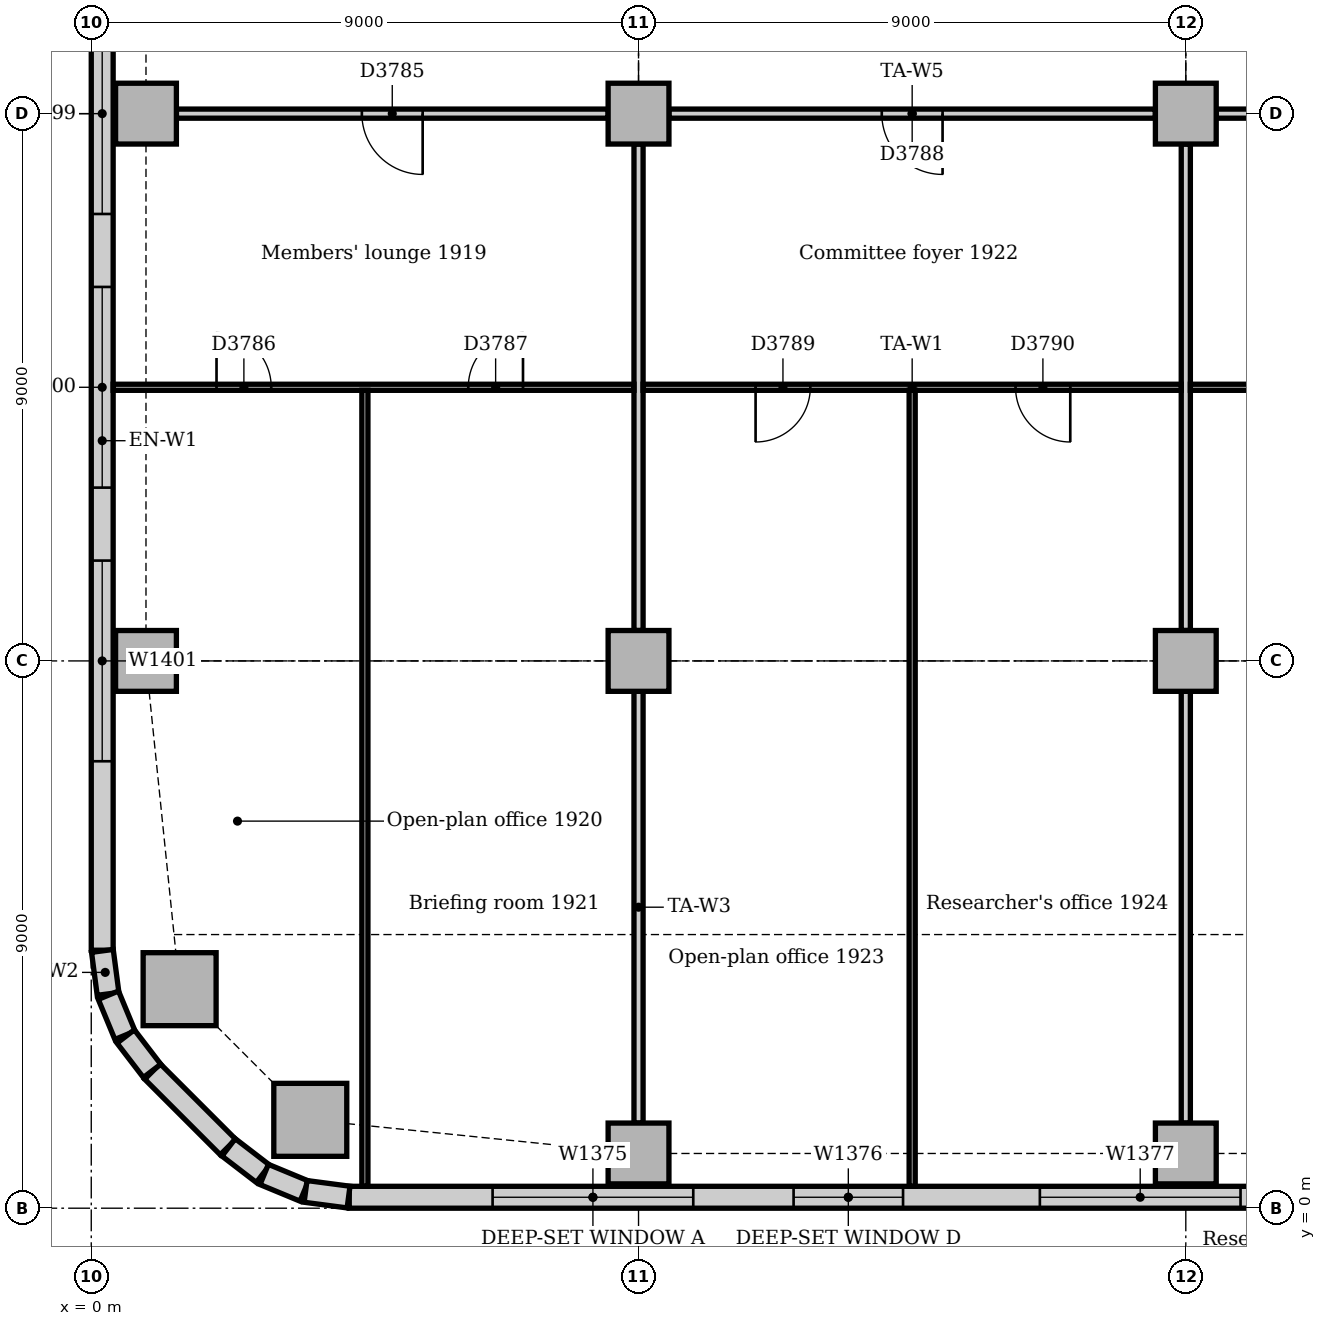
"""IFC4 building model, lengths in metres.
Left out: names, types, materials, properties, quantities, classifications, styles, units other than length and angle.
Written with IfcOpenShell. Run it as: python <this file> out.ifc"""

import sys

from ifc_helpers import new_model, si_unit, direction, frame, frame_2d, origin, origin_2d, place, context, subcontext, project, spatial, rectangle, extrude, element, fill, save


model = new_model("IFC4")
c1 = context("Model", 3, precision=1e-05, world=origin(), true_north=direction((0.0, 1.0)))
c2 = subcontext(c1, "Body", "Model", "MODEL_VIEW")
j1 = project(units=[si_unit("LENGTHUNIT", "METRE"), si_unit("PLANEANGLEUNIT", "RADIAN")], contexts=[c1])
p1 = place(None, origin())
s1 = spatial("IfcSite", under=j1, at=p1, CompositionType="ELEMENT")
p2 = place(p1, origin())
s2 = spatial("IfcBuilding", under=s1, at=p2, CompositionType="ELEMENT")
p3 = place(p2, frame((0.0, 0.0, 83.0)))
s3 = spatial("IfcBuildingStorey", under=s2, at=p3, CompositionType="ELEMENT", Elevation=83.0)
for number, where, z_axis, x_axis in (
    (1, (3.602, 1.453, 0.0), (0.0, 0.0, 1.0), (1.0, 0.0, 0.0)),
    (2, (1.453, 3.602, 0.0), (0.0, 0.0, 1.0), (1.0, 0.0, 0.0)),
):
    element("IfcColumn", number, at=place(p3, frame(where, z_axis=z_axis, x_axis=x_axis)), inside=s3, PredefinedType="COLUMN", context=c2, shape_type="SweptSolid", body=[
        extrude(rectangle(XDim=1.2, YDim=1.2, at=origin_2d()), origin(), (0.0, 0.0, 1.0), 3.85),
    ])
for number, where, z_axis, x_axis in (
    (3, (9.0, 0.9, 0.0), (0.0, 0.0, 1.0), (1.0, 0.0, 0.0)),
    (4, (18.0, 0.9, 0.0), (0.0, 0.0, 1.0), (1.0, 0.0, 0.0)),
    (5, (0.9, 9.0, 0.0), (0.0, 0.0, 1.0), (1.0, 0.0, 0.0)),
    (6, (0.9, 18.0, 0.0), (0.0, 0.0, 1.0), (1.0, 0.0, 0.0)),
    (7, (9.0, 9.0, 0.0), (0.0, 0.0, 1.0), (1.0, 0.0, 0.0)),
    (8, (9.0, 18.0, 0.0), (0.0, 0.0, 1.0), (1.0, 0.0, 0.0)),
    (9, (18.0, 9.0, 0.0), (0.0, 0.0, 1.0), (1.0, 0.0, 0.0)),
    (10, (18.0, 18.0, 0.0), (0.0, 0.0, 1.0), (1.0, 0.0, 0.0)),
):
    element("IfcColumn", number, at=place(p3, frame(where, z_axis=z_axis, x_axis=x_axis)), inside=s3, PredefinedType="COLUMN", context=c2, shape_type="SweptSolid", body=[
        extrude(rectangle(XDim=1.0, YDim=1.0, at=origin_2d()), origin(), (0.0, 0.0, 1.0), 3.85),
    ])
p4 = place(p3, frame((4.243, 0.18, 0.0), z_axis=(0.0, 0.0, 1.0), x_axis=(1.0, 0.0, 0.0)))
e11 = element("IfcWall", 11, at=p4, inside=s3, PredefinedType="STANDARD", context=c2, shape_type="SweptSolid", body=[
    extrude(rectangle(XDim=44.015, YDim=0.36, at=frame_2d((22.007, 0.0))), origin(), (0.0, 0.0, 1.0), 3.85),
])
p5 = place(p4, frame((2.357, 0.0, 0.9)))
e12 = element("IfcOpeningElement", 12, at=p5, cuts=e11, PredefinedType="OPENING", context=c2, shape_type="SweptSolid", body=[
    extrude(rectangle(XDim=3.3, YDim=1.6, at=frame_2d((1.65, 0.8))), frame((0.0, 0.19, 0.0), z_axis=(0.0, -1.0, 0.0), x_axis=(1.0, 0.0, 0.0)), (0.0, 0.0, 1.0), 0.38),
])
p6 = place(p4, frame((7.307, 0.0, 0.9)))
e13 = element("IfcOpeningElement", 13, at=p6, cuts=e11, PredefinedType="OPENING", context=c2, shape_type="SweptSolid", body=[
    extrude(rectangle(XDim=1.8, YDim=1.6, at=frame_2d((0.9, 0.8))), frame((0.0, 0.19, 0.0), z_axis=(0.0, -1.0, 0.0), x_axis=(1.0, 0.0, 0.0)), (0.0, 0.0, 1.0), 0.38),
])
p7 = place(p4, frame((11.357, 0.0, 0.9)))
e14 = element("IfcOpeningElement", 14, at=p7, cuts=e11, PredefinedType="OPENING", context=c2, shape_type="SweptSolid", body=[
    extrude(rectangle(XDim=3.3, YDim=1.6, at=frame_2d((1.65, 0.8))), frame((0.0, 0.19, 0.0), z_axis=(0.0, -1.0, 0.0), x_axis=(1.0, 0.0, 0.0)), (0.0, 0.0, 1.0), 0.38),
])
p8 = place(p4, frame((16.307, 0.0, 0.9)))
e15 = element("IfcOpeningElement", 15, at=p8, cuts=e11, PredefinedType="OPENING", context=c2, shape_type="SweptSolid", body=[
    extrude(rectangle(XDim=1.8, YDim=1.6, at=frame_2d((0.9, 0.8))), frame((0.0, 0.19, 0.0), z_axis=(0.0, -1.0, 0.0), x_axis=(1.0, 0.0, 0.0)), (0.0, 0.0, 1.0), 0.38),
])
p9 = place(p4, frame((20.357, 0.0, 0.9)))
e16 = element("IfcOpeningElement", 16, at=p9, cuts=e11, PredefinedType="OPENING", context=c2, shape_type="SweptSolid", body=[
    extrude(rectangle(XDim=3.3, YDim=1.6, at=frame_2d((1.65, 0.8))), frame((0.0, 0.19, 0.0), z_axis=(0.0, -1.0, 0.0), x_axis=(1.0, 0.0, 0.0)), (0.0, 0.0, 1.0), 0.38),
])
p10 = place(p4, frame((24.857, 0.0, 0.9)))
e17 = element("IfcOpeningElement", 17, at=p10, cuts=e11, PredefinedType="OPENING", context=c2, shape_type="SweptSolid", body=[
    extrude(rectangle(XDim=3.3, YDim=1.6, at=frame_2d((1.65, 0.8))), frame((0.0, 0.19, 0.0), z_axis=(0.0, -1.0, 0.0), x_axis=(1.0, 0.0, 0.0)), (0.0, 0.0, 1.0), 0.38),
])
p11 = place(p4, frame((29.707, 0.0, 0.9)))
e18 = element("IfcOpeningElement", 18, at=p11, cuts=e11, PredefinedType="OPENING", context=c2, shape_type="SweptSolid", body=[
    extrude(rectangle(XDim=3.3, YDim=1.6, at=frame_2d((1.65, 0.8))), frame((0.0, 0.19, 0.0), z_axis=(0.0, -1.0, 0.0), x_axis=(1.0, 0.0, 0.0)), (0.0, 0.0, 1.0), 0.38),
])
p12 = place(p4, frame((34.257, 0.0, 0.9)))
e19 = element("IfcOpeningElement", 19, at=p12, cuts=e11, PredefinedType="OPENING", context=c2, shape_type="SweptSolid", body=[
    extrude(rectangle(XDim=1.8, YDim=1.6, at=frame_2d((0.9, 0.8))), frame((0.0, 0.19, 0.0), z_axis=(0.0, -1.0, 0.0), x_axis=(1.0, 0.0, 0.0)), (0.0, 0.0, 1.0), 0.38),
])
p13 = place(p4, frame((38.357, 0.0, 0.9)))
e20 = element("IfcOpeningElement", 20, at=p13, cuts=e11, PredefinedType="OPENING", context=c2, shape_type="SweptSolid", body=[
    extrude(rectangle(XDim=3.3, YDim=1.6, at=frame_2d((1.65, 0.8))), frame((0.0, 0.19, 0.0), z_axis=(0.0, -1.0, 0.0), x_axis=(1.0, 0.0, 0.0)), (0.0, 0.0, 1.0), 0.38),
])
p14 = place(p3, frame((0.18, 21.0, 0.0), z_axis=(0.0, 0.0, 1.0), x_axis=(0.0, -1.0, 0.0)))
e21 = element("IfcWall", 21, at=p14, inside=s3, PredefinedType="STANDARD", context=c2, shape_type="SweptSolid", body=[
    extrude(rectangle(XDim=16.757, YDim=0.36, at=frame_2d((8.379, 0.0))), origin(), (0.0, 0.0, 1.0), 3.85),
])
p15 = place(p14, frame((1.35, 0.0, 0.9)))
e22 = element("IfcOpeningElement", 22, at=p15, cuts=e21, PredefinedType="OPENING", context=c2, shape_type="SweptSolid", body=[
    extrude(rectangle(XDim=3.3, YDim=1.6, at=frame_2d((1.65, 0.8))), frame((0.0, 0.19, 0.0), z_axis=(0.0, -1.0, 0.0), x_axis=(1.0, 0.0, 0.0)), (0.0, 0.0, 1.0), 0.38),
])
p16 = place(p14, frame((5.85, 0.0, 0.9)))
e23 = element("IfcOpeningElement", 23, at=p16, cuts=e21, PredefinedType="OPENING", context=c2, shape_type="SweptSolid", body=[
    extrude(rectangle(XDim=3.3, YDim=1.6, at=frame_2d((1.65, 0.8))), frame((0.0, 0.19, 0.0), z_axis=(0.0, -1.0, 0.0), x_axis=(1.0, 0.0, 0.0)), (0.0, 0.0, 1.0), 0.38),
])
p17 = place(p14, frame((10.35, 0.0, 0.9)))
e24 = element("IfcOpeningElement", 24, at=p17, cuts=e21, PredefinedType="OPENING", context=c2, shape_type="SweptSolid", body=[
    extrude(rectangle(XDim=3.3, YDim=1.6, at=frame_2d((1.65, 0.8))), frame((0.0, 0.19, 0.0), z_axis=(0.0, -1.0, 0.0), x_axis=(1.0, 0.0, 0.0)), (0.0, 0.0, 1.0), 0.38),
])
p18 = place(p3, frame((1.006, 2.249, 0.0), z_axis=(0.0, 0.0, 1.0), x_axis=(0.707106781187, -0.707106781187, 0.0)))
e25 = element("IfcWall", 25, at=p18, inside=s3, PredefinedType="STANDARD", context=c2, shape_type="SweptSolid", body=[
    extrude(rectangle(XDim=1.757, YDim=0.36, at=frame_2d((0.879, 0.0))), origin(), (0.0, 0.0, 1.0), 3.85),
])
for number, where, z_axis, x_axis in (
    (26, (0.183, 4.231, 0.0), (0.0, 0.0, 1.0), (0.131, -0.991, 0.0)),
    (27, (0.282, 3.503, 0.0), (0.0, 0.0, 1.0), (0.383, -0.924, 0.0)),
):
    element("IfcWall", number, at=place(p3, frame(where, z_axis=z_axis, x_axis=x_axis)), inside=s3, PredefinedType="STANDARD", context=c2, shape_type="SweptSolid", body=[
        extrude(rectangle(XDim=0.713, YDim=0.36, at=frame_2d((0.356, 0.0))), origin(), (0.0, 0.0, 1.0), 3.85),
    ])
for number, where, z_axis, x_axis in (
    (28, (0.566, 2.825, 0.0), (0.0, 0.0, 1.0), (0.609, -0.793, 0.0)),
    (29, (2.259, 1.0, 0.0), (0.0, 0.0, 1.0), (0.793, -0.609, 0.0)),
):
    element("IfcWall", number, at=place(p3, frame(where, z_axis=z_axis, x_axis=x_axis)), inside=s3, PredefinedType="STANDARD", context=c2, shape_type="SweptSolid", body=[
        extrude(rectangle(XDim=0.713, YDim=0.36, at=frame_2d((0.357, 0.0))), origin(), (0.0, 0.0, 1.0), 3.85),
    ])
for number, where, z_axis, x_axis in (
    (30, (2.844, 0.555, 0.0), (0.0, 0.0, 1.0), (0.924, -0.383, 0.0)),
    (31, (3.524, 0.276, 0.0), (0.0, 0.0, 1.0), (0.991, -0.131, 0.0)),
):
    element("IfcWall", number, at=place(p3, frame(where, z_axis=z_axis, x_axis=x_axis)), inside=s3, PredefinedType="STANDARD", context=c2, shape_type="SweptSolid", body=[
        extrude(rectangle(XDim=0.713, YDim=0.36, at=frame_2d((0.356, 0.0))), origin(), (0.0, 0.0, 1.0), 3.85),
    ])
p19 = place(p3, frame((18.5, 18.0, 0.0), z_axis=(0.0, 0.0, 1.0), x_axis=(1.0, 0.0, 0.0)))
e32 = element("IfcWall", 32, at=p19, inside=s3, PredefinedType="PARTITIONING", context=c2, shape_type="SweptSolid", body=[
    extrude(rectangle(XDim=8.0, YDim=0.15, at=frame_2d((4.0, 0.0))), origin(), (0.0, 0.0, 1.0), 3.15),
])
p20 = place(p19, frame((3.5, 0.0, 0.0)))
e33 = element("IfcOpeningElement", 33, at=p20, cuts=e32, PredefinedType="OPENING", context=c2, shape_type="SweptSolid", body=[
    extrude(rectangle(XDim=1.0, YDim=2.1, at=frame_2d((0.5, 1.05))), frame((0.0, 0.085, 0.0), z_axis=(0.0, -1.0, 0.0), x_axis=(1.0, 0.0, 0.0)), (0.0, 0.0, 1.0), 0.17),
])
p21 = place(p3, frame((9.5, 18.0, 0.0), z_axis=(0.0, 0.0, 1.0), x_axis=(1.0, 0.0, 0.0)))
e34 = element("IfcWall", 34, at=p21, inside=s3, PredefinedType="PARTITIONING", context=c2, shape_type="SweptSolid", body=[
    extrude(rectangle(XDim=8.0, YDim=0.15, at=frame_2d((4.0, 0.0))), origin(), (0.0, 0.0, 1.0), 3.15),
])
p22 = place(p21, frame((3.5, 0.0, 0.0)))
e35 = element("IfcOpeningElement", 35, at=p22, cuts=e34, PredefinedType="OPENING", context=c2, shape_type="SweptSolid", body=[
    extrude(rectangle(XDim=1.0, YDim=2.1, at=frame_2d((0.5, 1.05))), frame((0.0, 0.085, 0.0), z_axis=(0.0, -1.0, 0.0), x_axis=(1.0, 0.0, 0.0)), (0.0, 0.0, 1.0), 0.17),
])
p23 = place(p3, frame((1.4, 18.0, 0.0), z_axis=(0.0, 0.0, 1.0), x_axis=(1.0, 0.0, 0.0)))
e36 = element("IfcWall", 36, at=p23, inside=s3, PredefinedType="PARTITIONING", context=c2, shape_type="SweptSolid", body=[
    extrude(rectangle(XDim=7.1, YDim=0.15, at=frame_2d((3.55, 0.0))), origin(), (0.0, 0.0, 1.0), 3.15),
])
p24 = place(p23, frame((3.05, 0.0, 0.0)))
e37 = element("IfcOpeningElement", 37, at=p24, cuts=e36, PredefinedType="OPENING", context=c2, shape_type="SweptSolid", body=[
    extrude(rectangle(XDim=1.0, YDim=2.1, at=frame_2d((0.5, 1.05))), frame((0.0, 0.085, 0.0), z_axis=(0.0, -1.0, 0.0), x_axis=(1.0, 0.0, 0.0)), (0.0, 0.0, 1.0), 0.17),
])
p25 = place(p3, frame((9.0, 1.4, 0.0), z_axis=(0.0, 0.0, 1.0), x_axis=(0.0, 1.0, 0.0)))
e38 = element("IfcWall", 38, at=p25, inside=s3, PredefinedType="PARTITIONING", context=c2, shape_type="SweptSolid", body=[
    extrude(rectangle(XDim=7.1, YDim=0.15, at=frame_2d((3.55, 0.0))), origin(), (0.0, 0.0, 1.0), 3.158),
])
p26 = place(p3, frame((9.0, 9.5, 0.0), z_axis=(0.0, 0.0, 1.0), x_axis=(0.0, 1.0, 0.0)))
e39 = element("IfcWall", 39, at=p26, inside=s3, PredefinedType="PARTITIONING", context=c2, shape_type="SweptSolid", body=[
    extrude(rectangle(XDim=8.0, YDim=0.15, at=frame_2d((4.0, 0.0))), origin(), (0.0, 0.0, 1.0), 3.158),
])
p27 = place(p3, frame((18.0, 1.4, 0.0), z_axis=(0.0, 0.0, 1.0), x_axis=(0.0, 1.0, 0.0)))
e40 = element("IfcWall", 40, at=p27, inside=s3, PredefinedType="PARTITIONING", context=c2, shape_type="SweptSolid", body=[
    extrude(rectangle(XDim=7.1, YDim=0.15, at=frame_2d((3.55, 0.0))), origin(), (0.0, 0.0, 1.0), 3.158),
])
p28 = place(p3, frame((18.0, 9.5, 0.0), z_axis=(0.0, 0.0, 1.0), x_axis=(0.0, 1.0, 0.0)))
e41 = element("IfcWall", 41, at=p28, inside=s3, PredefinedType="PARTITIONING", context=c2, shape_type="SweptSolid", body=[
    extrude(rectangle(XDim=8.0, YDim=0.15, at=frame_2d((4.0, 0.0))), origin(), (0.0, 0.0, 1.0), 3.158),
])
p29 = place(p3, frame((18.075, 13.5, 0.0), z_axis=(0.0, 0.0, 1.0), x_axis=(1.0, 0.0, 0.0)))
e42 = element("IfcWall", 42, at=p29, inside=s3, PredefinedType="PARTITIONING", context=c2, shape_type="SweptSolid", body=[
    extrude(rectangle(XDim=8.85, YDim=0.1, at=frame_2d((4.425, 0.0))), origin(), (0.0, 0.0, 1.0), 3.35),
])
p30 = place(p29, frame((1.85, 0.0, 0.0)))
e43 = element("IfcOpeningElement", 43, at=p30, cuts=e42, PredefinedType="OPENING", context=c2, shape_type="SweptSolid", body=[
    extrude(rectangle(XDim=0.9, YDim=2.1, at=frame_2d((0.45, 1.05))), frame((0.0, 0.06, 0.0), z_axis=(0.0, -1.0, 0.0), x_axis=(1.0, 0.0, 0.0)), (0.0, 0.0, 1.0), 0.12),
])
p31 = place(p29, frame((6.125, 0.0, 0.0)))
e44 = element("IfcOpeningElement", 44, at=p31, cuts=e42, PredefinedType="OPENING", context=c2, shape_type="SweptSolid", body=[
    extrude(rectangle(XDim=0.9, YDim=2.1, at=frame_2d((0.45, 1.05))), frame((0.0, 0.06, 0.0), z_axis=(0.0, -1.0, 0.0), x_axis=(1.0, 0.0, 0.0)), (0.0, 0.0, 1.0), 0.12),
])
p32 = place(p3, frame((9.075, 13.5, 0.0), z_axis=(0.0, 0.0, 1.0), x_axis=(1.0, 0.0, 0.0)))
e45 = element("IfcWall", 45, at=p32, inside=s3, PredefinedType="PARTITIONING", context=c2, shape_type="SweptSolid", body=[
    extrude(rectangle(XDim=8.85, YDim=0.1, at=frame_2d((4.425, 0.0))), origin(), (0.0, 0.0, 1.0), 3.35),
])
p33 = place(p32, frame((1.85, 0.0, 0.0)))
e46 = element("IfcOpeningElement", 46, at=p33, cuts=e45, PredefinedType="OPENING", context=c2, shape_type="SweptSolid", body=[
    extrude(rectangle(XDim=0.9, YDim=2.1, at=frame_2d((0.45, 1.05))), frame((0.0, 0.06, 0.0), z_axis=(0.0, -1.0, 0.0), x_axis=(1.0, 0.0, 0.0)), (0.0, 0.0, 1.0), 0.12),
])
p34 = place(p32, frame((6.125, 0.0, 0.0)))
e47 = element("IfcOpeningElement", 47, at=p34, cuts=e45, PredefinedType="OPENING", context=c2, shape_type="SweptSolid", body=[
    extrude(rectangle(XDim=0.9, YDim=2.1, at=frame_2d((0.45, 1.05))), frame((0.0, 0.06, 0.0), z_axis=(0.0, -1.0, 0.0), x_axis=(1.0, 0.0, 0.0)), (0.0, 0.0, 1.0), 0.12),
])
p35 = place(p3, frame((0.36, 13.5, 0.0), z_axis=(0.0, 0.0, 1.0), x_axis=(1.0, 0.0, 0.0)))
e48 = element("IfcWall", 48, at=p35, inside=s3, PredefinedType="PARTITIONING", context=c2, shape_type="SweptSolid", body=[
    extrude(rectangle(XDim=8.565, YDim=0.1, at=frame_2d((4.282, 0.0))), origin(), (0.0, 0.0, 1.0), 3.35),
])
p36 = place(p35, frame((1.7, 0.0, 0.0)))
e49 = element("IfcOpeningElement", 49, at=p36, cuts=e48, PredefinedType="OPENING", context=c2, shape_type="SweptSolid", body=[
    extrude(rectangle(XDim=0.9, YDim=2.1, at=frame_2d((0.45, 1.05))), frame((0.0, 0.06, 0.0), z_axis=(0.0, -1.0, 0.0), x_axis=(1.0, 0.0, 0.0)), (0.0, 0.0, 1.0), 0.12),
])
p37 = place(p35, frame((5.84, 0.0, 0.0)))
e50 = element("IfcOpeningElement", 50, at=p37, cuts=e48, PredefinedType="OPENING", context=c2, shape_type="SweptSolid", body=[
    extrude(rectangle(XDim=0.9, YDim=2.1, at=frame_2d((0.45, 1.05))), frame((0.0, 0.06, 0.0), z_axis=(0.0, -1.0, 0.0), x_axis=(1.0, 0.0, 0.0)), (0.0, 0.0, 1.0), 0.12),
])
for number, where, z_axis, x_axis in (
    (51, (13.5, 0.36, 0.0), (0.0, 0.0, 1.0), (0.0, 1.0, 0.0)),
    (52, (4.5, 0.36, 0.0), (0.0, 0.0, 1.0), (0.0, 1.0, 0.0)),
):
    element("IfcWall", number, at=place(p3, frame(where, z_axis=z_axis, x_axis=x_axis)), inside=s3, PredefinedType="PARTITIONING", context=c2, shape_type="SweptSolid", body=[
        extrude(rectangle(XDim=13.09, YDim=0.1, at=frame_2d((6.545, 0.0))), origin(), (0.0, 0.0, 1.0), 3.85),
    ])
p38 = place(p5, origin())
e53 = element("IfcWindow", 53, at=p38, inside=s3, PartitioningType="SINGLE_PANEL", PredefinedType="WINDOW", context=c2, shape_type="SweptSolid", body=[
    extrude(rectangle(XDim=3.3, YDim=1.6, at=frame_2d((1.65, 0.8))), frame((0.0, 0.13, 0.0), z_axis=(0.0, -1.0, 0.0), x_axis=(1.0, 0.0, 0.0)), (0.0, 0.0, 1.0), 0.06),
])
fill(e12, e53)
p39 = place(p6, origin())
e54 = element("IfcWindow", 54, at=p39, inside=s3, PartitioningType="SINGLE_PANEL", PredefinedType="WINDOW", context=c2, shape_type="SweptSolid", body=[
    extrude(rectangle(XDim=1.8, YDim=1.6, at=frame_2d((0.9, 0.8))), frame((0.0, 0.13, 0.0), z_axis=(0.0, -1.0, 0.0), x_axis=(1.0, 0.0, 0.0)), (0.0, 0.0, 1.0), 0.06),
])
fill(e13, e54)
p40 = place(p7, origin())
e55 = element("IfcWindow", 55, at=p40, inside=s3, PartitioningType="SINGLE_PANEL", PredefinedType="WINDOW", context=c2, shape_type="SweptSolid", body=[
    extrude(rectangle(XDim=3.3, YDim=1.6, at=frame_2d((1.65, 0.8))), frame((0.0, 0.13, 0.0), z_axis=(0.0, -1.0, 0.0), x_axis=(1.0, 0.0, 0.0)), (0.0, 0.0, 1.0), 0.06),
])
fill(e14, e55)
p41 = place(p15, origin())
e56 = element("IfcWindow", 56, at=p41, inside=s3, PartitioningType="SINGLE_PANEL", PredefinedType="WINDOW", context=c2, shape_type="SweptSolid", body=[
    extrude(rectangle(XDim=3.3, YDim=1.6, at=frame_2d((1.65, 0.8))), frame((0.0, 0.13, 0.0), z_axis=(0.0, -1.0, 0.0), x_axis=(1.0, 0.0, 0.0)), (0.0, 0.0, 1.0), 0.06),
])
fill(e22, e56)
p42 = place(p16, origin())
e57 = element("IfcWindow", 57, at=p42, inside=s3, PartitioningType="SINGLE_PANEL", PredefinedType="WINDOW", context=c2, shape_type="SweptSolid", body=[
    extrude(rectangle(XDim=3.3, YDim=1.6, at=frame_2d((1.65, 0.8))), frame((0.0, 0.13, 0.0), z_axis=(0.0, -1.0, 0.0), x_axis=(1.0, 0.0, 0.0)), (0.0, 0.0, 1.0), 0.06),
])
fill(e23, e57)
p43 = place(p17, origin())
e58 = element("IfcWindow", 58, at=p43, inside=s3, PartitioningType="SINGLE_PANEL", PredefinedType="WINDOW", context=c2, shape_type="SweptSolid", body=[
    extrude(rectangle(XDim=3.3, YDim=1.6, at=frame_2d((1.65, 0.8))), frame((0.0, 0.13, 0.0), z_axis=(0.0, -1.0, 0.0), x_axis=(1.0, 0.0, 0.0)), (0.0, 0.0, 1.0), 0.06),
])
fill(e24, e58)
p44 = place(p24, frame((1.0, 0.0, 0.0), z_axis=(0.0, 0.0, 1.0), x_axis=(-1.0, 0.0, 0.0)))
e59 = element("IfcDoor", 59, at=p44, inside=s3, OperationType="SINGLE_SWING_LEFT", PredefinedType="DOOR", context=c2, shape_type="SweptSolid", body=[
    extrude(rectangle(XDim=1.0, YDim=2.1, at=frame_2d((0.5, 1.05))), frame((0.0, 0.025, 0.0), z_axis=(0.0, -1.0, 0.0), x_axis=(1.0, 0.0, 0.0)), (0.0, 0.0, 1.0), 0.05),
])
fill(e37, e59)
p45 = place(p36, origin())
e60 = element("IfcDoor", 60, at=p45, inside=s3, OperationType="SINGLE_SWING_LEFT", PredefinedType="DOOR", context=c2, shape_type="SweptSolid", body=[
    extrude(rectangle(XDim=0.9, YDim=2.1, at=frame_2d((0.45, 1.05))), frame((0.0, 0.025, 0.0), z_axis=(0.0, -1.0, 0.0), x_axis=(1.0, 0.0, 0.0)), (0.0, 0.0, 1.0), 0.05),
])
fill(e49, e60)
p46 = place(p37, origin())
e61 = element("IfcDoor", 61, at=p46, inside=s3, OperationType="SINGLE_SWING_RIGHT", PredefinedType="DOOR", context=c2, shape_type="SweptSolid", body=[
    extrude(rectangle(XDim=0.9, YDim=2.1, at=frame_2d((0.45, 1.05))), frame((0.0, 0.025, 0.0), z_axis=(0.0, -1.0, 0.0), x_axis=(1.0, 0.0, 0.0)), (0.0, 0.0, 1.0), 0.05),
])
fill(e50, e61)
p47 = place(p22, frame((1.0, 0.0, 0.0), z_axis=(0.0, 0.0, 1.0), x_axis=(-1.0, 0.0, 0.0)))
e62 = element("IfcDoor", 62, at=p47, inside=s3, OperationType="SINGLE_SWING_LEFT", PredefinedType="DOOR", context=c2, shape_type="SweptSolid", body=[
    extrude(rectangle(XDim=1.0, YDim=2.1, at=frame_2d((0.5, 1.05))), frame((0.0, 0.025, 0.0), z_axis=(0.0, -1.0, 0.0), x_axis=(1.0, 0.0, 0.0)), (0.0, 0.0, 1.0), 0.05),
])
fill(e35, e62)
p48 = place(p33, frame((0.9, 0.0, 0.0), z_axis=(0.0, 0.0, 1.0), x_axis=(-1.0, 0.0, 0.0)))
e63 = element("IfcDoor", 63, at=p48, inside=s3, OperationType="SINGLE_SWING_RIGHT", PredefinedType="DOOR", context=c2, shape_type="SweptSolid", body=[
    extrude(rectangle(XDim=0.9, YDim=2.1, at=frame_2d((0.45, 1.05))), frame((0.0, 0.025, 0.0), z_axis=(0.0, -1.0, 0.0), x_axis=(1.0, 0.0, 0.0)), (0.0, 0.0, 1.0), 0.05),
])
fill(e46, e63)
p49 = place(p34, frame((0.9, 0.0, 0.0), z_axis=(0.0, 0.0, 1.0), x_axis=(-1.0, 0.0, 0.0)))
e64 = element("IfcDoor", 64, at=p49, inside=s3, OperationType="SINGLE_SWING_LEFT", PredefinedType="DOOR", context=c2, shape_type="SweptSolid", body=[
    extrude(rectangle(XDim=0.9, YDim=2.1, at=frame_2d((0.45, 1.05))), frame((0.0, 0.025, 0.0), z_axis=(0.0, -1.0, 0.0), x_axis=(1.0, 0.0, 0.0)), (0.0, 0.0, 1.0), 0.05),
])
fill(e47, e64)
save(model, sys.argv[1])
